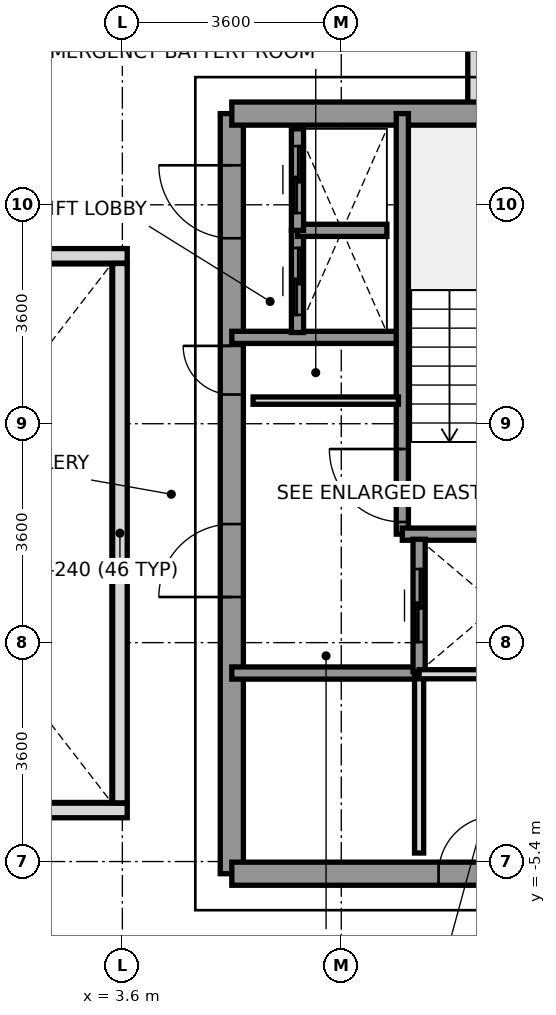
"""IFC4 building model, lengths in metres.
Left out: names, types, materials, properties, quantities, classifications, styles, units other than length and angle.
Written with IfcOpenShell. Run it as: python <this file> out.ifc"""

import sys

from ifc_helpers import new_model, si_unit, direction, frame, frame_2d, origin, place, context, subcontext, project, spatial, rectangle, extrude, source, transform, mapped, element, fill, save


model = new_model("IFC4")
c1 = context("Model", 3, precision=1e-05, world=origin(), true_north=direction((0.0, 1.0)))
c2 = subcontext(c1, "Body", "Model", "MODEL_VIEW")
j1 = project(units=[si_unit("LENGTHUNIT", "METRE"), si_unit("PLANEANGLEUNIT", "RADIAN")], contexts=[c1])
p1 = place(None, origin())
s1 = spatial("IfcSite", under=j1, at=p1, CompositionType="ELEMENT")
p2 = place(p1, origin())
s2 = spatial("IfcBuilding", under=s1, at=p2, CompositionType="ELEMENT")
p3 = place(p2, frame((0.0, 0.0, 201.2)))
s3 = spatial("IfcBuildingStorey", under=s2, at=p3, CompositionType="ELEMENT", Elevation=201.2)
p4 = place(p3, frame((9.4, 8.547, 0.0), z_axis=(0.0, 0.0, 1.0), x_axis=(0.0, -1.0, 0.0)))
e1 = element("IfcWall", 1, at=p4, inside=s3, PredefinedType="PARAPET", context=c2, shape_type="SweptSolid", body=[
    extrude(rectangle(XDim=1.594, YDim=0.24, at=frame_2d((0.797, 0.0))), origin(), (0.0, 0.0, 1.0), 1.15),
])
p5 = place(p3, frame((5.4, -5.6, 0.0), z_axis=(0.0, 0.0, 1.0), x_axis=(0.0, 1.0, 0.0)))
e2 = element("IfcWall", 2, at=p5, inside=s3, PredefinedType="SHEAR", context=c2, shape_type="SweptSolid", body=[
    extrude(rectangle(XDim=12.5, YDim=0.38, at=frame_2d((6.25, 0.0))), origin(), (0.0, 0.0, 1.0), 3.2),
])
p6 = place(p5, frame((4.55, 0.0, 0.0)))
e3 = element("IfcOpeningElement", 3, at=p6, cuts=e2, PredefinedType="OPENING", context=c2, shape_type="SweptSolid", body=[
    extrude(rectangle(XDim=1.2, YDim=2.2, at=frame_2d((0.6, 1.1))), frame((0.0, 0.2, 0.0), z_axis=(0.0, -1.0, 0.0), x_axis=(1.0, 0.0, 0.0)), (0.0, 0.0, 1.0), 0.4),
])
p7 = place(p5, frame((10.45, 0.0, 0.0)))
e4 = element("IfcOpeningElement", 4, at=p7, cuts=e2, PredefinedType="OPENING", context=c2, shape_type="SweptSolid", body=[
    extrude(rectangle(XDim=1.2, YDim=2.2, at=frame_2d((0.6, 1.1))), frame((0.0, 0.2, 0.0), z_axis=(0.0, -1.0, 0.0), x_axis=(1.0, 0.0, 0.0)), (0.0, 0.0, 1.0), 0.4),
])
p8 = place(p5, frame((7.88, 0.0, 0.0)))
e5 = element("IfcOpeningElement", 5, at=p8, cuts=e2, PredefinedType="OPENING", context=c2, shape_type="SweptSolid", body=[
    extrude(rectangle(XDim=0.8, YDim=2.1, at=frame_2d((0.4, 1.05))), frame((0.0, 0.2, 0.0), z_axis=(0.0, -1.0, 0.0), x_axis=(1.0, 0.0, 0.0)), (0.0, 0.0, 1.0), 0.4),
])
p9 = place(p3, frame((5.4, 6.9, 0.0), z_axis=(0.0, 0.0, 1.0), x_axis=(1.0, 0.0, 0.0)))
e6 = element("IfcWall", 6, at=p9, inside=s3, PredefinedType="SHEAR", context=c2, shape_type="SweptSolid", body=[
    extrude(rectangle(XDim=5.956, YDim=0.38, at=frame_2d((2.978, 0.0))), origin(), (0.0, 0.0, 1.0), 3.2),
])
p10 = place(p3, frame((5.4, -5.6, 0.0), z_axis=(0.0, 0.0, 1.0), x_axis=(1.0, 0.0, 0.0)))
e7 = element("IfcWall", 7, at=p10, inside=s3, PredefinedType="SHEAR", context=c2, shape_type="SweptSolid", body=[
    extrude(rectangle(XDim=7.8, YDim=0.38, at=frame_2d((3.9, 0.0))), origin(), (0.0, 0.0, 1.0), 3.2),
])
p11 = place(p10, frame((5.85, 0.0, 0.0)))
e8 = element("IfcOpeningElement", 8, at=p11, cuts=e7, PredefinedType="OPENING", context=c2, shape_type="SweptSolid", body=[
    extrude(rectangle(XDim=0.8, YDim=2.1, at=frame_2d((0.4, 1.05))), frame((0.0, 0.2, 0.0), z_axis=(0.0, -1.0, 0.0), x_axis=(1.0, 0.0, 0.0)), (0.0, 0.0, 1.0), 0.4),
])
p12 = place(p10, frame((3.4, 0.0, 0.0)))
e9 = element("IfcOpeningElement", 9, at=p12, cuts=e7, PredefinedType="OPENING", context=c2, shape_type="SweptSolid", body=[
    extrude(rectangle(XDim=0.95, YDim=2.15, at=frame_2d((0.475, 1.075))), frame((0.0, 0.2, 0.0), z_axis=(0.0, -1.0, 0.0), x_axis=(1.0, 0.0, 0.0)), (0.0, 0.0, 1.0), 0.4),
])
p13 = place(p3, frame((5.4, 3.22, 0.0), z_axis=(0.0, 0.0, 1.0), x_axis=(1.0, 0.0, 0.0)))
e10 = element("IfcWall", 10, at=p13, inside=s3, PredefinedType="SOLIDWALL", context=c2, shape_type="SweptSolid", body=[
    extrude(rectangle(XDim=2.78, YDim=0.2, at=frame_2d((1.39, 0.0))), origin(), (0.0, 0.0, 1.0), 3.2),
])
p14 = place(p3, frame((5.4, -2.3, 0.0), z_axis=(0.0, 0.0, 1.0), x_axis=(1.0, 0.0, 0.0)))
e11 = element("IfcWall", 11, at=p14, inside=s3, PredefinedType="SOLIDWALL", context=c2, shape_type="SweptSolid", body=[
    extrude(rectangle(XDim=3.08, YDim=0.2, at=frame_2d((1.54, 0.0))), origin(), (0.0, 0.0, 1.0), 3.2),
])
p15 = place(p3, frame((8.204, -0.016, 0.0), z_axis=(0.0, 0.0, 1.0), x_axis=(0.0, 1.0, 0.0)))
e12 = element("IfcWall", 12, at=p15, inside=s3, PredefinedType="SOLIDWALL", context=c2, shape_type="SweptSolid", body=[
    extrude(rectangle(XDim=6.916, YDim=0.2, at=frame_2d((3.458, 0.0))), origin(), (0.0, 0.0, 1.0), 3.2),
])
p16 = place(p15, frame((0.2, 0.0, 0.0)))
e13 = element("IfcOpeningElement", 13, at=p16, cuts=e12, PredefinedType="OPENING", context=c2, shape_type="SweptSolid", body=[
    extrude(rectangle(XDim=1.2, YDim=2.2, at=frame_2d((0.6, 1.1))), frame((0.0, 0.11, 0.0), z_axis=(0.0, -1.0, 0.0), x_axis=(1.0, 0.0, 0.0)), (0.0, 0.0, 1.0), 0.22),
])
p17 = place(p3, frame((8.204, -0.016, 0.0), z_axis=(0.0, 0.0, 1.0), x_axis=(1.0, 0.0, 0.0)))
e14 = element("IfcWall", 14, at=p17, inside=s3, PredefinedType="SOLIDWALL", context=c2, shape_type="SweptSolid", body=[
    extrude(rectangle(XDim=3.152, YDim=0.2, at=frame_2d((1.576, 0.0))), origin(), (0.0, 0.0, 1.0), 3.2),
])
p18 = place(p3, frame((8.48, -2.28, 0.0), z_axis=(0.0, 0.0, 1.0), x_axis=(0.0, 1.0, 0.0)))
e15 = element("IfcWall", 15, at=p18, inside=s3, PredefinedType="SOLIDWALL", context=c2, shape_type="SweptSolid", body=[
    extrude(rectangle(XDim=2.18, YDim=0.2, at=frame_2d((1.09, 0.0))), origin(), (0.0, 0.0, 1.0), 3.2),
])
p19 = place(p18, frame((0.49, 0.0, 0.0)))
e16 = element("IfcOpeningElement", 16, at=p19, cuts=e15, PredefinedType="OPENING", context=c2, shape_type="SweptSolid", body=[
    extrude(rectangle(XDim=1.2, YDim=2.2, at=frame_2d((0.6, 1.1))), frame((0.0, 0.11, 0.0), z_axis=(0.0, -1.0, 0.0), x_axis=(1.0, 0.0, 0.0)), (0.0, 0.0, 1.0), 0.22),
])
p20 = place(p3, frame((6.48, 3.3, 0.0), z_axis=(0.0, 0.0, 1.0), x_axis=(0.0, 1.0, 0.0)))
e17 = element("IfcWall", 17, at=p20, inside=s3, PredefinedType="SOLIDWALL", context=c2, shape_type="SweptSolid", body=[
    extrude(rectangle(XDim=1.68, YDim=0.2, at=frame_2d((0.84, 0.0))), origin(), (0.0, 0.0, 1.0), 3.2),
])
p21 = place(p20, frame((0.29, 0.0, 0.0)))
e18 = element("IfcOpeningElement", 18, at=p21, cuts=e17, PredefinedType="OPENING", context=c2, shape_type="SweptSolid", body=[
    extrude(rectangle(XDim=1.1, YDim=2.2, at=frame_2d((0.55, 1.1))), frame((0.0, 0.11, 0.0), z_axis=(0.0, -1.0, 0.0), x_axis=(1.0, 0.0, 0.0)), (0.0, 0.0, 1.0), 0.22),
])
p22 = place(p3, frame((6.48, 4.98, 0.0), z_axis=(0.0, 0.0, 1.0), x_axis=(1.0, 0.0, 0.0)))
e19 = element("IfcWall", 19, at=p22, inside=s3, PredefinedType="SOLIDWALL", context=c2, shape_type="SweptSolid", body=[
    extrude(rectangle(XDim=1.47, YDim=0.2, at=frame_2d((0.735, 0.0))), origin(), (0.0, 0.0, 1.0), 3.2),
])
p23 = place(p3, frame((6.48, 4.98, 0.0), z_axis=(0.0, 0.0, 1.0), x_axis=(0.0, 1.0, 0.0)))
e20 = element("IfcWall", 20, at=p23, inside=s3, PredefinedType="SOLIDWALL", context=c2, shape_type="SweptSolid", body=[
    extrude(rectangle(XDim=1.67, YDim=0.2, at=frame_2d((0.835, 0.0))), origin(), (0.0, 0.0, 1.0), 3.2),
])
p24 = place(p23, frame((0.285, 0.0, 0.0)))
e21 = element("IfcOpeningElement", 21, at=p24, cuts=e20, PredefinedType="OPENING", context=c2, shape_type="SweptSolid", body=[
    extrude(rectangle(XDim=1.1, YDim=2.2, at=frame_2d((0.55, 1.1))), frame((0.0, 0.11, 0.0), z_axis=(0.0, -1.0, 0.0), x_axis=(1.0, 0.0, 0.0)), (0.0, 0.0, 1.0), 0.22),
])
p25 = place(p3, frame((5.75, 2.18, 0.0), z_axis=(0.0, 0.0, 1.0), x_axis=(1.0, 0.0, 0.0)))
e22 = element("IfcWall", 22, at=p25, inside=s3, PredefinedType="PARTITIONING", context=c2, shape_type="SweptSolid", body=[
    extrude(rectangle(XDim=2.39, YDim=0.12, at=frame_2d((1.195, 0.0))), origin(), (0.0, 0.0, 1.0), 2.3),
])
p26 = place(p3, frame((8.48, -5.26, 0.0), z_axis=(0.0, 0.0, 1.0), x_axis=(0.0, 1.0, 0.0)))
e23 = element("IfcWall", 23, at=p26, inside=s3, PredefinedType="PARTITIONING", context=c2, shape_type="SweptSolid", body=[
    extrude(rectangle(XDim=2.94, YDim=0.15, at=frame_2d((1.47, 0.0))), origin(), (0.0, 0.0, 1.0), 3.2),
])
p27 = place(p3, frame((8.48, -2.32, 0.0), z_axis=(0.0, 0.0, 1.0), x_axis=(1.0, 0.0, 0.0)))
e24 = element("IfcWall", 24, at=p27, inside=s3, PredefinedType="PARTITIONING", context=c2, shape_type="SweptSolid", body=[
    extrude(rectangle(XDim=2.56, YDim=0.15, at=frame_2d((1.28, 0.0))), origin(), (0.0, 0.0, 1.0), 3.2),
])
for number, where, z_axis, x_axis in (
    (25, (-3.68, -4.56, 0.0), (0.0, 0.0, 1.0), (1.0, 0.0, 0.0)),
    (26, (-3.68, 4.56, 0.0), (0.0, 0.0, 1.0), (1.0, 0.0, 0.0)),
):
    element("IfcWall", number, at=place(p3, frame(where, z_axis=z_axis, x_axis=x_axis)), inside=s3, PredefinedType="PARAPET", context=c2, shape_type="SweptSolid", body=[
        extrude(rectangle(XDim=7.36, YDim=0.24, at=frame_2d((3.68, 0.0))), origin(), (0.0, 0.0, 1.0), 1.15),
    ])
p28 = place(p3, frame((3.56, -4.435, 0.0), z_axis=(0.0, 0.0, 1.0), x_axis=(0.0, 1.0, 0.0)))
e27 = element("IfcWall", 27, at=p28, inside=s3, PredefinedType="PARAPET", context=c2, shape_type="SweptSolid", body=[
    extrude(rectangle(XDim=8.87, YDim=0.24, at=frame_2d((4.435, 0.0))), origin(), (0.0, 0.0, 1.0), 1.15),
])
m1 = source(origin(), c2, "Body", "SweptSolid", [
    extrude(rectangle(XDim=1.2, YDim=2.2, at=frame_2d((0.6, 1.1))), frame((0.0, 0.025, 0.0), z_axis=(0.0, -1.0, 0.0), x_axis=(1.0, 0.0, 0.0)), (0.0, 0.0, 1.0), 0.05),
])
p29 = place(p16, origin())
e28 = element("IfcDoor", 28, at=p29, inside=s3, OperationType="SINGLE_SWING_RIGHT", PredefinedType="DOOR", context=c2, shape_type="MappedRepresentation", body=[
    mapped(m1, transform((0.0, 0.0, 0.0), x_axis=(1.0, 0.0, 0.0), y_axis=(0.0, 1.0, 0.0), z_axis=(0.0, 0.0, 1.0), scale=1.0)),
])
fill(e13, e28)
p30 = place(p6, origin())
e29 = element("IfcDoor", 29, at=p30, inside=s3, OperationType="SINGLE_SWING_LEFT", PredefinedType="DOOR", context=c2, shape_type="MappedRepresentation", body=[
    mapped(m1, transform((0.0, 0.0, 0.0), x_axis=(1.0, 0.0, 0.0), y_axis=(0.0, 1.0, 0.0), z_axis=(0.0, 0.0, 1.0), scale=1.0)),
])
fill(e3, e29)
p31 = place(p7, origin())
e30 = element("IfcDoor", 30, at=p31, inside=s3, OperationType="SINGLE_SWING_RIGHT", PredefinedType="DOOR", context=c2, shape_type="MappedRepresentation", body=[
    mapped(m1, transform((0.0, 0.0, 0.0), x_axis=(1.0, 0.0, 0.0), y_axis=(0.0, 1.0, 0.0), z_axis=(0.0, 0.0, 1.0), scale=1.0)),
])
fill(e4, e30)
m2 = source(origin(), c2, "Body", "SweptSolid", [
    extrude(rectangle(XDim=0.8, YDim=2.1, at=frame_2d((0.4, 1.05))), frame((0.0, 0.025, 0.0), z_axis=(0.0, -1.0, 0.0), x_axis=(1.0, 0.0, 0.0)), (0.0, 0.0, 1.0), 0.05),
])
p32 = place(p8, origin())
e31 = element("IfcDoor", 31, at=p32, inside=s3, OperationType="SINGLE_SWING_RIGHT", PredefinedType="DOOR", context=c2, shape_type="MappedRepresentation", body=[
    mapped(m2, transform((0.0, 0.0, 0.0), x_axis=(1.0, 0.0, 0.0), y_axis=(0.0, 1.0, 0.0), z_axis=(0.0, 0.0, 1.0), scale=1.0)),
])
fill(e5, e31)
m3 = source(origin(), c2, "Body", "SweptSolid", [
    extrude(rectangle(XDim=0.95, YDim=2.15, at=frame_2d((0.475, 1.075))), frame((0.0, 0.025, 0.0), z_axis=(0.0, -1.0, 0.0), x_axis=(1.0, 0.0, 0.0)), (0.0, 0.0, 1.0), 0.05),
])
p33 = place(p12, origin())
e32 = element("IfcDoor", 32, at=p33, inside=s3, OperationType="SINGLE_SWING_RIGHT", PredefinedType="DOOR", context=c2, shape_type="MappedRepresentation", body=[
    mapped(m3, transform((0.0, 0.0, 0.0), x_axis=(1.0, 0.0, 0.0), y_axis=(0.0, 1.0, 0.0), z_axis=(0.0, 0.0, 1.0), scale=1.0)),
])
fill(e9, e32)
p34 = place(p19, origin())
e33 = element("IfcDoor", 33, at=p34, inside=s3, OperationType="SLIDING_TO_RIGHT", PredefinedType="DOOR", context=c2, shape_type="MappedRepresentation", body=[
    mapped(m1, transform((0.0, 0.0, 0.0), x_axis=(1.0, 0.0, 0.0), y_axis=(0.0, 1.0, 0.0), z_axis=(0.0, 0.0, 1.0), scale=1.0)),
])
fill(e16, e33)
m4 = source(origin(), c2, "Body", "SweptSolid", [
    extrude(rectangle(XDim=1.1, YDim=2.2, at=frame_2d((0.55, 1.1))), frame((0.0, 0.025, 0.0), z_axis=(0.0, -1.0, 0.0), x_axis=(1.0, 0.0, 0.0)), (0.0, 0.0, 1.0), 0.05),
])
p35 = place(p21, origin())
e34 = element("IfcDoor", 34, at=p35, inside=s3, OperationType="SLIDING_TO_LEFT", PredefinedType="DOOR", context=c2, shape_type="MappedRepresentation", body=[
    mapped(m4, transform((0.0, 0.0, 0.0), x_axis=(1.0, 0.0, 0.0), y_axis=(0.0, 1.0, 0.0), z_axis=(0.0, 0.0, 1.0), scale=1.0)),
])
fill(e18, e34)
p36 = place(p24, origin())
e35 = element("IfcDoor", 35, at=p36, inside=s3, OperationType="SLIDING_TO_LEFT", PredefinedType="DOOR", context=c2, shape_type="MappedRepresentation", body=[
    mapped(m4, transform((0.0, 0.0, 0.0), x_axis=(1.0, 0.0, 0.0), y_axis=(0.0, 1.0, 0.0), z_axis=(0.0, 0.0, 1.0), scale=1.0)),
])
fill(e21, e35)
save(model, sys.argv[1])
